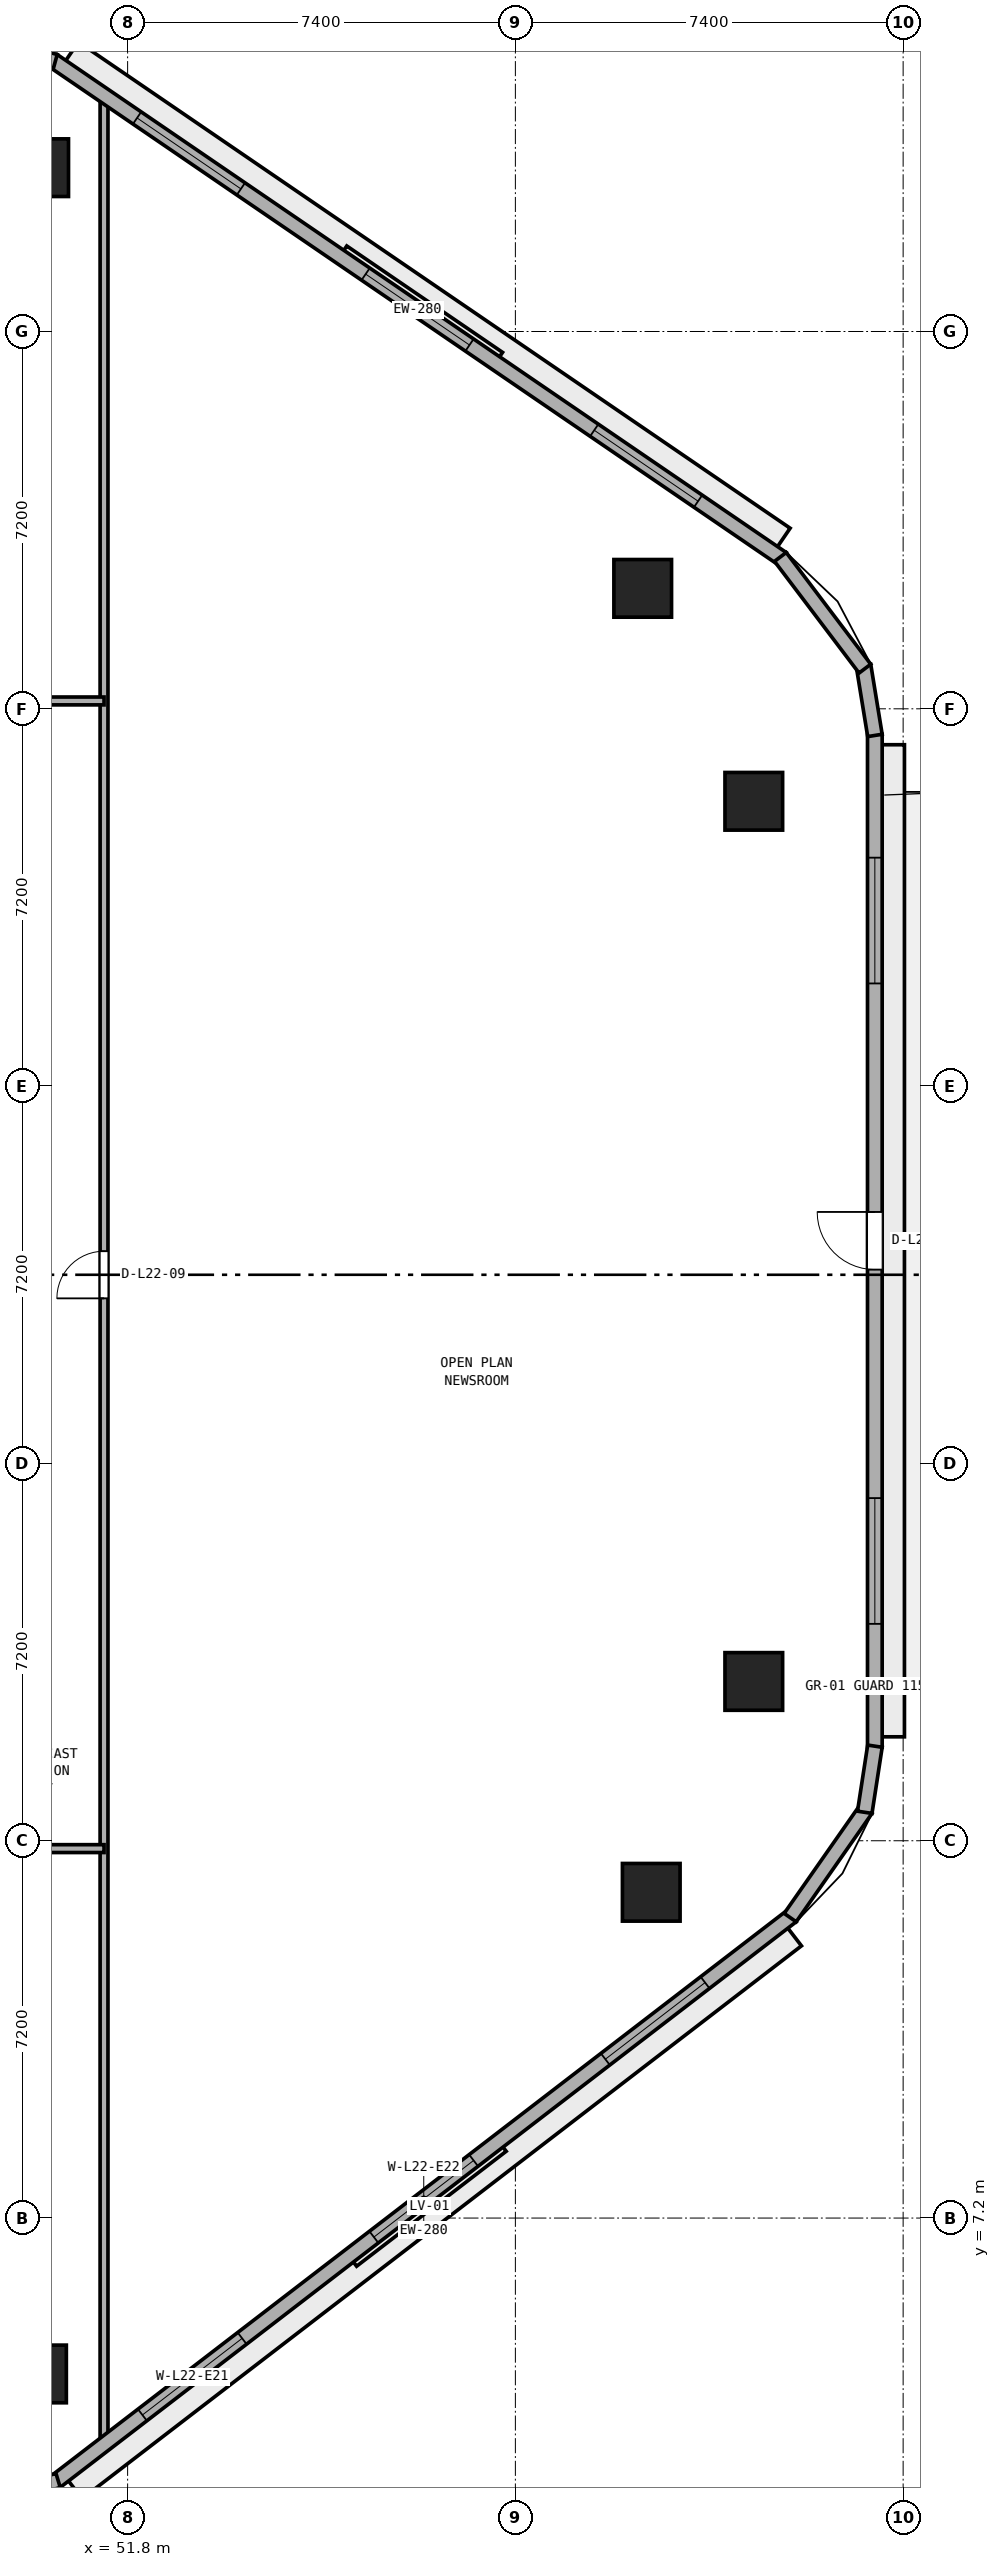
"""IFC4 building model, lengths in metres.
Left out: names, types, materials, properties, quantities, classifications, styles, units other than length and angle.
Written with IfcOpenShell. Run it as: python <this file> out.ifc"""

import sys

from ifc_helpers import new_model, si_unit, direction, frame, frame_2d, origin, origin_2d, place, context, subcontext, project, spatial, rectangle, extrude, element, fill, save


model = new_model("IFC4")
c1 = context("Model", 3, precision=1e-05, world=origin(), true_north=direction((0.0, 1.0)))
c2 = subcontext(c1, "Body", "Model", "MODEL_VIEW")
j1 = project(units=[si_unit("LENGTHUNIT", "METRE"), si_unit("PLANEANGLEUNIT", "RADIAN")], contexts=[c1])
p1 = place(None, origin())
s1 = spatial("IfcSite", under=j1, at=p1, CompositionType="ELEMENT")
p2 = place(p1, origin())
s2 = spatial("IfcBuilding", under=s1, at=p2, CompositionType="ELEMENT")
p3 = place(p2, frame((0.0, 0.0, 89.6)))
s3 = spatial("IfcBuildingStorey", under=s2, at=p3, CompositionType="ELEMENT", Elevation=89.6)
for number, where, z_axis, x_axis in (
    (1, (50.081, 4.225, 0.0), (0.0, 0.0, 1.0), (1.0, 0.0, 0.0)),
    (2, (61.793, 13.416, 0.0), (0.0, 0.0, 1.0), (1.0, 0.0, 0.0)),
    (3, (63.75, 17.44, 0.0), (0.0, 0.0, 1.0), (1.0, 0.0, 0.0)),
    (4, (63.75, 34.235, 0.0), (0.0, 0.0, 1.0), (1.0, 0.0, 0.0)),
    (5, (61.63, 38.299, 0.0), (0.0, 0.0, 1.0), (1.0, 0.0, 0.0)),
    (6, (50.122, 46.326, 0.0), (0.0, 0.0, 1.0), (1.0, 0.0, 0.0)),
):
    element("IfcColumn", number, at=place(p3, frame(where, z_axis=z_axis, x_axis=x_axis)), inside=s3, PredefinedType="COLUMN", context=c2, shape_type="SweptSolid", body=[
        extrude(rectangle(XDim=1.1, YDim=1.1, at=origin_2d()), origin(), (0.0, 0.0, 1.0), 3.8),
    ])
p4 = place(p3, frame((51.35, 2.843, 0.0), z_axis=(0.0, 0.0, 1.0), x_axis=(0.0, 1.0, 0.0)))
e7 = element("IfcWall", 7, at=p4, inside=s3, PredefinedType="PARTITIONING", context=c2, shape_type="SweptSolid", body=[
    extrude(rectangle(XDim=44.892, YDim=0.15, at=frame_2d((22.446, 0.0))), origin(), (0.0, 0.0, 1.0), 3.525),
])
p5 = place(p4, frame((21.907, 0.0, 0.0)))
e8 = element("IfcOpeningElement", 8, at=p5, cuts=e7, PredefinedType="OPENING", context=c2, shape_type="SweptSolid", body=[
    extrude(rectangle(XDim=0.9, YDim=2.1, at=frame_2d((0.45, 1.05))), frame((0.0, 0.085, 0.0), z_axis=(0.0, -1.0, 0.0), x_axis=(1.0, 0.0, 0.0)), (0.0, 0.0, 1.0), 0.17),
])
p6 = place(p3, frame((22.65, 14.25, 0.0), z_axis=(0.0, 0.0, 1.0), x_axis=(1.0, 0.0, 0.0)))
e9 = element("IfcWall", 9, at=p6, inside=s3, PredefinedType="PARTITIONING", context=c2, shape_type="SweptSolid", body=[
    extrude(rectangle(XDim=28.7, YDim=0.15, at=frame_2d((14.35, 0.0))), origin(), (0.0, 0.0, 1.0), 3.525),
])
p7 = place(p6, frame((4.845, 0.0, 0.0)))
e10 = element("IfcOpeningElement", 10, at=p7, cuts=e9, PredefinedType="OPENING", context=c2, shape_type="SweptSolid", body=[
    extrude(rectangle(XDim=0.9, YDim=2.1, at=frame_2d((0.45, 1.05))), frame((0.0, 0.085, 0.0), z_axis=(0.0, -1.0, 0.0), x_axis=(1.0, 0.0, 0.0)), (0.0, 0.0, 1.0), 0.17),
])
p8 = place(p6, frame((15.65, 0.0, 0.0)))
e11 = element("IfcOpeningElement", 11, at=p8, cuts=e9, PredefinedType="OPENING", context=c2, shape_type="SweptSolid", body=[
    extrude(rectangle(XDim=0.9, YDim=2.1, at=frame_2d((0.45, 1.05))), frame((0.0, 0.085, 0.0), z_axis=(0.0, -1.0, 0.0), x_axis=(1.0, 0.0, 0.0)), (0.0, 0.0, 1.0), 0.17),
])
p9 = place(p6, frame((24.705, 0.0, 0.0)))
e12 = element("IfcOpeningElement", 12, at=p9, cuts=e9, PredefinedType="OPENING", context=c2, shape_type="SweptSolid", body=[
    extrude(rectangle(XDim=0.9, YDim=2.1, at=frame_2d((0.45, 1.05))), frame((0.0, 0.085, 0.0), z_axis=(0.0, -1.0, 0.0), x_axis=(1.0, 0.0, 0.0)), (0.0, 0.0, 1.0), 0.17),
])
p10 = place(p3, frame((22.65, 36.15, 0.0), z_axis=(0.0, 0.0, 1.0), x_axis=(1.0, 0.0, 0.0)))
e13 = element("IfcWall", 13, at=p10, inside=s3, PredefinedType="PARTITIONING", context=c2, shape_type="SweptSolid", body=[
    extrude(rectangle(XDim=28.7, YDim=0.15, at=frame_2d((14.35, 0.0))), origin(), (0.0, 0.0, 1.0), 3.525),
])
p11 = place(p10, frame((6.095, 0.0, 0.0)))
e14 = element("IfcOpeningElement", 14, at=p11, cuts=e13, PredefinedType="OPENING", context=c2, shape_type="SweptSolid", body=[
    extrude(rectangle(XDim=0.9, YDim=2.1, at=frame_2d((0.45, 1.05))), frame((0.0, 0.085, 0.0), z_axis=(0.0, -1.0, 0.0), x_axis=(1.0, 0.0, 0.0)), (0.0, 0.0, 1.0), 0.17),
])
p12 = place(p10, frame((20.155, 0.0, 0.0)))
e15 = element("IfcOpeningElement", 15, at=p12, cuts=e13, PredefinedType="OPENING", context=c2, shape_type="SweptSolid", body=[
    extrude(rectangle(XDim=1.0, YDim=2.12, at=frame_2d((0.5, 1.06))), frame((0.0, 0.085, 0.0), z_axis=(0.0, -1.0, 0.0), x_axis=(1.0, 0.0, 0.0)), (0.0, 0.0, 1.0), 0.17),
])
p13 = place(p3, frame((50.429, 2.172, 0.0), z_axis=(0.0, 0.0, 1.0), x_axis=(0.792937466367, 0.609303023488, 0.0)))
e16 = element("IfcWall", 16, at=p13, inside=s3, PredefinedType="STANDARD", context=c2, shape_type="SweptSolid", body=[
    extrude(rectangle(XDim=17.713, YDim=0.28, at=frame_2d((8.856, 0.0))), origin(), (0.0, 0.0, 1.0), 3.525),
])
p14 = place(p13, frame((2.085, 0.0, 0.9)))
e17 = element("IfcOpeningElement", 17, at=p14, cuts=e16, PredefinedType="OPENING", context=c2, shape_type="SweptSolid", body=[
    extrude(rectangle(XDim=2.4, YDim=1.75, at=frame_2d((1.2, 0.875))), frame((0.0, 0.15, 0.0), z_axis=(0.0, -1.0, 0.0), x_axis=(1.0, 0.0, 0.0)), (0.0, 0.0, 1.0), 0.3),
])
p15 = place(p13, frame((7.656, 0.0, 0.9)))
e18 = element("IfcOpeningElement", 18, at=p15, cuts=e16, PredefinedType="OPENING", context=c2, shape_type="SweptSolid", body=[
    extrude(rectangle(XDim=2.4, YDim=1.75, at=frame_2d((1.2, 0.875))), frame((0.0, 0.15, 0.0), z_axis=(0.0, -1.0, 0.0), x_axis=(1.0, 0.0, 0.0)), (0.0, 0.0, 1.0), 0.3),
])
p16 = place(p13, frame((13.227, 0.0, 0.9)))
e19 = element("IfcOpeningElement", 19, at=p16, cuts=e16, PredefinedType="OPENING", context=c2, shape_type="SweptSolid", body=[
    extrude(rectangle(XDim=2.4, YDim=1.75, at=frame_2d((1.2, 0.875))), frame((0.0, 0.15, 0.0), z_axis=(0.0, -1.0, 0.0), x_axis=(1.0, 0.0, 0.0)), (0.0, 0.0, 1.0), 0.3),
])
p17 = place(p3, frame((66.06, 16.183, 0.0), z_axis=(0.0, 0.0, 1.0), x_axis=(0.0, 1.0, 0.0)))
e20 = element("IfcWall", 20, at=p17, inside=s3, PredefinedType="STANDARD", context=c2, shape_type="SweptSolid", body=[
    extrude(rectangle(XDim=19.331, YDim=0.28, at=frame_2d((9.666, 0.0))), origin(), (0.0, 0.0, 1.0), 3.525),
])
p18 = place(p17, frame((9.115, 0.0, 0.0)))
e21 = element("IfcOpeningElement", 21, at=p18, cuts=e20, PredefinedType="OPENING", context=c2, shape_type="SweptSolid", body=[
    extrude(rectangle(XDim=1.1, YDim=2.2, at=frame_2d((0.55, 1.1))), frame((0.0, 0.15, 0.0), z_axis=(0.0, -1.0, 0.0), x_axis=(1.0, 0.0, 0.0)), (0.0, 0.0, 1.0), 0.3),
])
p19 = place(p17, frame((2.355, 0.0, 0.9)))
e22 = element("IfcOpeningElement", 22, at=p19, cuts=e20, PredefinedType="OPENING", context=c2, shape_type="SweptSolid", body=[
    extrude(rectangle(XDim=2.4, YDim=1.75, at=frame_2d((1.2, 0.875))), frame((0.0, 0.15, 0.0), z_axis=(0.0, -1.0, 0.0), x_axis=(1.0, 0.0, 0.0)), (0.0, 0.0, 1.0), 0.3),
])
p20 = place(p17, frame((14.576, 0.0, 0.9)))
e23 = element("IfcOpeningElement", 23, at=p20, cuts=e20, PredefinedType="OPENING", context=c2, shape_type="SweptSolid", body=[
    extrude(rectangle(XDim=2.4, YDim=1.75, at=frame_2d((1.2, 0.875))), frame((0.0, 0.15, 0.0), z_axis=(0.0, -1.0, 0.0), x_axis=(1.0, 0.0, 0.0)), (0.0, 0.0, 1.0), 0.3),
])
p21 = place(p3, frame((64.29, 38.867, 0.0), z_axis=(0.0, 0.0, 1.0), x_axis=(-0.825755550159, 0.564028165416, 0.0)))
e24 = element("IfcWall", 24, at=p21, inside=s3, PredefinedType="STANDARD", context=c2, shape_type="SweptSolid", body=[
    extrude(rectangle(XDim=16.848, YDim=0.28, at=frame_2d((8.424, 0.0))), origin(), (0.0, 0.0, 1.0), 3.525),
])
p22 = place(p21, frame((1.941, 0.0, 0.9)))
e25 = element("IfcOpeningElement", 25, at=p22, cuts=e24, PredefinedType="OPENING", context=c2, shape_type="SweptSolid", body=[
    extrude(rectangle(XDim=2.4, YDim=1.75, at=frame_2d((1.2, 0.875))), frame((0.0, 0.15, 0.0), z_axis=(0.0, -1.0, 0.0), x_axis=(1.0, 0.0, 0.0)), (0.0, 0.0, 1.0), 0.3),
])
p23 = place(p21, frame((7.224, 0.0, 0.9)))
e26 = element("IfcOpeningElement", 26, at=p23, cuts=e24, PredefinedType="OPENING", context=c2, shape_type="SweptSolid", body=[
    extrude(rectangle(XDim=2.4, YDim=1.75, at=frame_2d((1.2, 0.875))), frame((0.0, 0.15, 0.0), z_axis=(0.0, -1.0, 0.0), x_axis=(1.0, 0.0, 0.0)), (0.0, 0.0, 1.0), 0.3),
])
p24 = place(p21, frame((12.507, 0.0, 0.9)))
e27 = element("IfcOpeningElement", 27, at=p24, cuts=e24, PredefinedType="OPENING", context=c2, shape_type="SweptSolid", body=[
    extrude(rectangle(XDim=2.4, YDim=1.75, at=frame_2d((1.2, 0.875))), frame((0.0, 0.15, 0.0), z_axis=(0.0, -1.0, 0.0), x_axis=(1.0, 0.0, 0.0)), (0.0, 0.0, 1.0), 0.3),
])
p25 = place(p3, frame((47.65, 1.333, 0.0), z_axis=(0.0, 0.0, 1.0), x_axis=(0.956461287977, 0.291859220516, 0.0)))
e28 = element("IfcWall", 28, at=p25, inside=s3, PredefinedType="STANDARD", context=c2, shape_type="SweptSolid", body=[
    extrude(rectangle(XDim=2.952, YDim=0.28, at=frame_2d((1.476, 0.0))), origin(), (0.0, 0.0, 1.0), 3.525),
])
p26 = place(p3, frame((64.444, 12.933, 0.0), z_axis=(0.0, 0.0, 1.0), x_axis=(0.573176686443, 0.819431806875, 0.0)))
e29 = element("IfcWall", 29, at=p26, inside=s3, PredefinedType="STANDARD", context=c2, shape_type="SweptSolid", body=[
    extrude(rectangle(XDim=2.524, YDim=0.28, at=frame_2d((1.262, 0.0))), origin(), (0.0, 0.0, 1.0), 3.525),
])
p27 = place(p3, frame((65.867, 14.943, 0.0), z_axis=(0.0, 0.0, 1.0), x_axis=(0.152014078361, 0.988378328364, 0.0)))
e30 = element("IfcWall", 30, at=p27, inside=s3, PredefinedType="STANDARD", context=c2, shape_type="SweptSolid", body=[
    extrude(rectangle(XDim=1.277, YDim=0.28, at=frame_2d((0.638, 0.0))), origin(), (0.0, 0.0, 1.0), 3.525),
])
p28 = place(p3, frame((66.062, 35.492, 0.0), z_axis=(0.0, 0.0, 1.0), x_axis=(-0.161182073582, 0.986924687682, 0.0)))
e31 = element("IfcWall", 31, at=p28, inside=s3, PredefinedType="STANDARD", context=c2, shape_type="SweptSolid", body=[
    extrude(rectangle(XDim=1.354, YDim=0.28, at=frame_2d((0.677, 0.0))), origin(), (0.0, 0.0, 1.0), 3.525),
])
p29 = place(p3, frame((65.87, 36.767, 0.0), z_axis=(0.0, 0.0, 1.0), x_axis=(-0.603370463754, 0.797461023166, 0.0)))
e32 = element("IfcWall", 32, at=p29, inside=s3, PredefinedType="STANDARD", context=c2, shape_type="SweptSolid", body=[
    extrude(rectangle(XDim=2.673, YDim=0.28, at=frame_2d((1.336, 0.0))), origin(), (0.0, 0.0, 1.0), 3.525),
])
p30 = place(p3, frame((50.419, 48.351, 0.0), z_axis=(0.0, 0.0, 1.0), x_axis=(-0.964254516967, 0.264977784933, 0.0)))
e33 = element("IfcWall", 33, at=p30, inside=s3, PredefinedType="STANDARD", context=c2, shape_type="SweptSolid", body=[
    extrude(rectangle(XDim=2.731, YDim=0.28, at=frame_2d((1.365, 0.0))), origin(), (0.0, 0.0, 1.0), 3.525),
])
p31 = place(p5, origin())
e34 = element("IfcDoor", 34, at=p31, inside=s3, OperationType="SINGLE_SWING_LEFT", PredefinedType="DOOR", context=c2, shape_type="SweptSolid", body=[
    extrude(rectangle(XDim=0.9, YDim=2.1, at=frame_2d((0.45, 1.05))), frame((0.0, 0.025, 0.0), z_axis=(0.0, -1.0, 0.0), x_axis=(1.0, 0.0, 0.0)), (0.0, 0.0, 1.0), 0.05),
])
fill(e8, e34)
p32 = place(p14, origin())
e35 = element("IfcWindow", 35, at=p32, inside=s3, PartitioningType="SINGLE_PANEL", PredefinedType="WINDOW", context=c2, shape_type="SweptSolid", body=[
    extrude(rectangle(XDim=2.4, YDim=1.75, at=frame_2d((1.2, 0.875))), frame((0.0, 0.03, 0.0), z_axis=(0.0, -1.0, 0.0), x_axis=(1.0, 0.0, 0.0)), (0.0, 0.0, 1.0), 0.06),
])
fill(e17, e35)
p33 = place(p15, origin())
e36 = element("IfcWindow", 36, at=p33, inside=s3, PartitioningType="SINGLE_PANEL", PredefinedType="WINDOW", context=c2, shape_type="SweptSolid", body=[
    extrude(rectangle(XDim=2.4, YDim=1.75, at=frame_2d((1.2, 0.875))), frame((0.0, 0.03, 0.0), z_axis=(0.0, -1.0, 0.0), x_axis=(1.0, 0.0, 0.0)), (0.0, 0.0, 1.0), 0.06),
])
fill(e18, e36)
p34 = place(p16, origin())
e37 = element("IfcWindow", 37, at=p34, inside=s3, PartitioningType="SINGLE_PANEL", PredefinedType="WINDOW", context=c2, shape_type="SweptSolid", body=[
    extrude(rectangle(XDim=2.4, YDim=1.75, at=frame_2d((1.2, 0.875))), frame((0.0, 0.03, 0.0), z_axis=(0.0, -1.0, 0.0), x_axis=(1.0, 0.0, 0.0)), (0.0, 0.0, 1.0), 0.06),
])
fill(e19, e37)
p35 = place(p18, origin())
e38 = element("IfcDoor", 38, at=p35, inside=s3, OperationType="SINGLE_SWING_RIGHT", PredefinedType="DOOR", context=c2, shape_type="SweptSolid", body=[
    extrude(rectangle(XDim=1.1, YDim=2.2, at=frame_2d((0.55, 1.1))), frame((0.0, 0.025, 0.0), z_axis=(0.0, -1.0, 0.0), x_axis=(1.0, 0.0, 0.0)), (0.0, 0.0, 1.0), 0.05),
])
fill(e21, e38)
p36 = place(p19, origin())
e39 = element("IfcWindow", 39, at=p36, inside=s3, PartitioningType="SINGLE_PANEL", PredefinedType="WINDOW", context=c2, shape_type="SweptSolid", body=[
    extrude(rectangle(XDim=2.4, YDim=1.75, at=frame_2d((1.2, 0.875))), frame((0.0, 0.03, 0.0), z_axis=(0.0, -1.0, 0.0), x_axis=(1.0, 0.0, 0.0)), (0.0, 0.0, 1.0), 0.06),
])
fill(e22, e39)
p37 = place(p20, origin())
e40 = element("IfcWindow", 40, at=p37, inside=s3, PartitioningType="SINGLE_PANEL", PredefinedType="WINDOW", context=c2, shape_type="SweptSolid", body=[
    extrude(rectangle(XDim=2.4, YDim=1.75, at=frame_2d((1.2, 0.875))), frame((0.0, 0.03, 0.0), z_axis=(0.0, -1.0, 0.0), x_axis=(1.0, 0.0, 0.0)), (0.0, 0.0, 1.0), 0.06),
])
fill(e23, e40)
p38 = place(p22, origin())
e41 = element("IfcWindow", 41, at=p38, inside=s3, PartitioningType="SINGLE_PANEL", PredefinedType="WINDOW", context=c2, shape_type="SweptSolid", body=[
    extrude(rectangle(XDim=2.4, YDim=1.75, at=frame_2d((1.2, 0.875))), frame((0.0, 0.03, 0.0), z_axis=(0.0, -1.0, 0.0), x_axis=(1.0, 0.0, 0.0)), (0.0, 0.0, 1.0), 0.06),
])
fill(e25, e41)
p39 = place(p23, origin())
e42 = element("IfcWindow", 42, at=p39, inside=s3, PartitioningType="SINGLE_PANEL", PredefinedType="WINDOW", context=c2, shape_type="SweptSolid", body=[
    extrude(rectangle(XDim=2.4, YDim=1.75, at=frame_2d((1.2, 0.875))), frame((0.0, 0.03, 0.0), z_axis=(0.0, -1.0, 0.0), x_axis=(1.0, 0.0, 0.0)), (0.0, 0.0, 1.0), 0.06),
])
fill(e26, e42)
p40 = place(p24, origin())
e43 = element("IfcWindow", 43, at=p40, inside=s3, PartitioningType="SINGLE_PANEL", PredefinedType="WINDOW", context=c2, shape_type="SweptSolid", body=[
    extrude(rectangle(XDim=2.4, YDim=1.75, at=frame_2d((1.2, 0.875))), frame((0.0, 0.03, 0.0), z_axis=(0.0, -1.0, 0.0), x_axis=(1.0, 0.0, 0.0)), (0.0, 0.0, 1.0), 0.06),
])
fill(e27, e43)
save(model, sys.argv[1])
